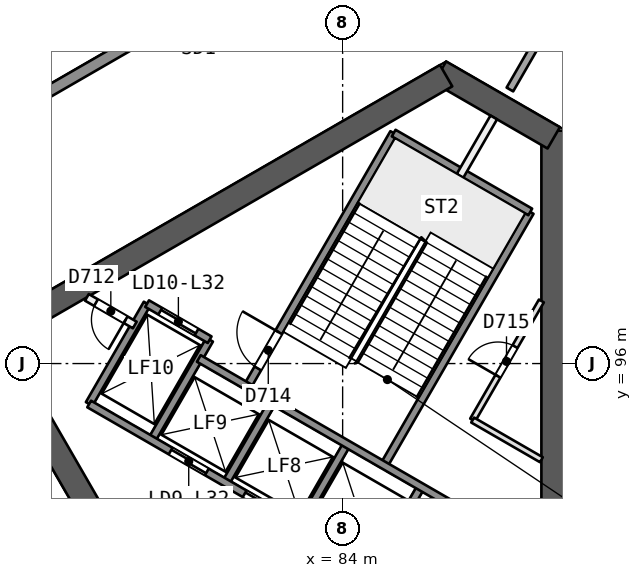
"""IFC4 building model, lengths in metres.
Left out: names, types, materials, properties, quantities, classifications, styles, units other than length and angle.
Written with IfcOpenShell. Run it as: python <this file> out.ifc"""

import sys

from ifc_helpers import new_model, si_unit, direction, frame, frame_2d, origin, place, context, subcontext, project, spatial, rectangle, extrude, element, fill, save


model = new_model("IFC4")
c1 = context("Model", 3, precision=1e-05, world=origin(), true_north=direction((0.0, 1.0)))
c2 = subcontext(c1, "Body", "Model", "MODEL_VIEW")
j1 = project(units=[si_unit("LENGTHUNIT", "METRE"), si_unit("PLANEANGLEUNIT", "RADIAN")], contexts=[c1])
p1 = place(None, origin())
s1 = spatial("IfcSite", under=j1, at=p1, CompositionType="ELEMENT")
p2 = place(p1, origin())
s2 = spatial("IfcBuilding", under=s1, at=p2, CompositionType="ELEMENT")
p3 = place(p2, frame((0.0, 0.0, 132.7)))
s3 = spatial("IfcBuildingStorey", under=s2, at=p3, CompositionType="ELEMENT", Elevation=132.7)
p4 = place(p3, frame((89.555, 88.119, 0.0), z_axis=(0.0, 0.0, 1.0), x_axis=(0.0, 1.0, 0.0)))
e1 = element("IfcWall", 1, at=p4, inside=s3, PredefinedType="SHEAR", context=c2, shape_type="SweptSolid", body=[
    extrude(rectangle(XDim=14.009, YDim=0.65, at=frame_2d((7.004, 0.0))), origin(), (0.0, 0.0, 1.0), 3.7),
])
p5 = place(p3, frame((89.555, 101.94, 0.0), z_axis=(0.0, 0.0, 1.0), x_axis=(-0.866031550877, 0.499989352773, 0.0)))
e2 = element("IfcWall", 2, at=p5, inside=s3, PredefinedType="SHEAR", context=c2, shape_type="SweptSolid", body=[
    extrude(rectangle(XDim=3.458, YDim=0.65, at=frame_2d((1.729, 0.0))), origin(), (0.0, 0.0, 1.0), 3.7),
])
p6 = place(p3, frame((86.723, 103.575, 0.0), z_axis=(0.0, 0.0, 1.0), x_axis=(-0.866031824457, -0.499988878904, 0.0)))
e3 = element("IfcWall", 3, at=p6, inside=s3, PredefinedType="SHEAR", context=c2, shape_type="SweptSolid", body=[
    extrude(rectangle(XDim=14.146, YDim=0.65, at=frame_2d((7.073, 0.0))), origin(), (0.0, 0.0, 1.0), 3.7),
])
p7 = place(p3, frame((74.754, 96.665, 0.0), z_axis=(0.0, 0.0, 1.0), x_axis=(0.500011799426, -0.866018591275, 0.0)))
e4 = element("IfcWall", 4, at=p7, inside=s3, PredefinedType="SHEAR", context=c2, shape_type="SweptSolid", body=[
    extrude(rectangle(XDim=10.055, YDim=0.65, at=frame_2d((5.027, 0.0))), origin(), (0.0, 0.0, 1.0), 3.7),
])
p8 = place(p7, frame((7.905, 0.0, 0.0)))
e5 = element("IfcOpeningElement", 5, at=p8, cuts=e4, PredefinedType="OPENING", context=c2, shape_type="SweptSolid", body=[
    extrude(rectangle(XDim=1.2, YDim=2.1, at=frame_2d((0.6, 1.05))), frame((0.0, 0.335, 0.0), z_axis=(0.0, -1.0, 0.0), x_axis=(1.0, 0.0, 0.0)), (0.0, 0.0, 1.0), 0.671),
])
p9 = place(p3, frame((91.877, 109.232, 0.0), z_axis=(0.0, 0.0, 1.0), x_axis=(-0.499972739829, -0.866041141879, 0.0)))
e6 = element("IfcWall", 6, at=p9, inside=s3, PredefinedType="PARTITIONING", context=c2, shape_type="SweptSolid", body=[
    extrude(rectangle(XDim=6.952, YDim=0.2, at=frame_2d((3.476, 0.0))), origin(), (0.0, 0.0, 1.0), 3.25),
])
p10 = place(p3, frame((72.541, 97.171, 0.0), z_axis=(0.0, 0.0, 1.0), x_axis=(0.5000018851, -0.866024315419, 0.0)))
e7 = element("IfcWall", 7, at=p10, inside=s3, PredefinedType="PARTITIONING", context=c2, shape_type="SweptSolid", body=[
    extrude(rectangle(XDim=9.0, YDim=0.2, at=frame_2d((4.5, 0.0))), origin(), (0.0, 0.0, 1.0), 3.25),
])
p11 = place(p3, frame((41.097, 82.858, 0.0), z_axis=(0.0, 0.0, 1.0), x_axis=(0.866026276916, 0.499998487688, 0.0)))
e8 = element("IfcWall", 8, at=p11, inside=s3, PredefinedType="SOLIDWALL", context=c2, shape_type="SweptSolid", body=[
    extrude(rectangle(XDim=55.864, YDim=0.3, at=frame_2d((27.932, 0.0))), origin(), (0.0, 0.0, 1.0), 3.25),
])
p12 = place(p11, frame((26.888, 0.0, 0.0)))
e9 = element("IfcOpeningElement", 9, at=p12, cuts=e8, PredefinedType="OPENING", context=c2, shape_type="SweptSolid", body=[
    extrude(rectangle(XDim=2.4, YDim=2.4, at=frame_2d((1.2, 1.2))), frame((0.0, 0.161, 0.0), z_axis=(0.0, -1.0, 0.0), x_axis=(1.0, 0.0, 0.0)), (0.0, 0.0, 1.0), 0.321),
])
p13 = place(p11, frame((32.188, 0.0, 0.0)))
e10 = element("IfcOpeningElement", 10, at=p13, cuts=e8, PredefinedType="OPENING", context=c2, shape_type="SweptSolid", body=[
    extrude(rectangle(XDim=2.4, YDim=2.4, at=frame_2d((1.2, 1.2))), frame((0.0, 0.161, 0.0), z_axis=(0.0, -1.0, 0.0), x_axis=(1.0, 0.0, 0.0)), (0.0, 0.0, 1.0), 0.321),
])
p14 = place(p11, frame((43.384, 0.0, 0.0)))
e11 = element("IfcOpeningElement", 11, at=p14, cuts=e8, PredefinedType="OPENING", context=c2, shape_type="SweptSolid", body=[
    extrude(rectangle(XDim=2.4, YDim=2.4, at=frame_2d((1.2, 1.2))), frame((0.0, 0.161, 0.0), z_axis=(0.0, -1.0, 0.0), x_axis=(1.0, 0.0, 0.0)), (0.0, 0.0, 1.0), 0.321),
])
p15 = place(p11, frame((21.432, 0.0, 0.0)))
e12 = element("IfcOpeningElement", 12, at=p15, cuts=e8, PredefinedType="OPENING", context=c2, shape_type="SweptSolid", body=[
    extrude(rectangle(XDim=2.4, YDim=2.4, at=frame_2d((1.2, 1.2))), frame((0.0, 0.161, 0.0), z_axis=(0.0, -1.0, 0.0), x_axis=(1.0, 0.0, 0.0)), (0.0, 0.0, 1.0), 0.321),
])
p16 = place(p11, frame((10.029, 0.0, 0.0)))
e13 = element("IfcOpeningElement", 13, at=p16, cuts=e8, PredefinedType="OPENING", context=c2, shape_type="SweptSolid", body=[
    extrude(rectangle(XDim=2.4, YDim=2.4, at=frame_2d((1.2, 1.2))), frame((0.0, 0.161, 0.0), z_axis=(0.0, -1.0, 0.0), x_axis=(1.0, 0.0, 0.0)), (0.0, 0.0, 1.0), 0.321),
])
p17 = place(p3, frame((87.421, 94.514, 0.0), z_axis=(0.0, 0.0, 1.0), x_axis=(0.499993116331, 0.866029378036, 0.0)))
e14 = element("IfcWall", 14, at=p17, inside=s3, PredefinedType="PARTITIONING", context=c2, shape_type="SweptSolid", body=[
    extrude(rectangle(XDim=3.618, YDim=0.15, at=frame_2d((1.809, 0.0))), origin(), (0.0, 0.0, 1.0), 3.25),
])
p18 = place(p17, frame((1.332, 0.0, 0.0)))
e15 = element("IfcOpeningElement", 15, at=p18, cuts=e14, PredefinedType="OPENING", context=c2, shape_type="SweptSolid", body=[
    extrude(rectangle(XDim=0.9, YDim=2.1, at=frame_2d((0.45, 1.05))), frame((0.0, 0.085, 0.0), z_axis=(0.0, -1.0, 0.0), x_axis=(1.0, 0.0, 0.0)), (0.0, 0.0, 1.0), 0.171),
])
p19 = place(p3, frame((84.821, 90.611, 0.0), z_axis=(0.0, 0.0, 1.0), x_axis=(0.499961042966, 0.86604789447, 0.0)))
e16 = element("IfcWall", 16, at=p19, inside=s3, PredefinedType="SOLIDWALL", context=c2, shape_type="SweptSolid", body=[
    extrude(rectangle(XDim=2.48, YDim=0.2, at=frame_2d((1.24, 0.0))), origin(), (0.0, 0.0, 1.0), 3.25),
])
p20 = place(p3, frame((85.087, 93.321, 0.0), z_axis=(0.0, 0.0, 1.0), x_axis=(0.500019787375, 0.866013979237, 0.0)))
e17 = element("IfcWall", 17, at=p20, inside=s3, PredefinedType="SOLIDWALL", context=c2, shape_type="SweptSolid", body=[
    extrude(rectangle(XDim=7.7, YDim=0.2, at=frame_2d((3.85, 0.0))), origin(), (0.0, 0.0, 1.0), 3.25),
])
p21 = place(p3, frame((82.873, 91.736, 0.0), z_axis=(0.0, 0.0, 1.0), x_axis=(0.499961042966, 0.86604789447, 0.0)))
e18 = element("IfcWall", 18, at=p21, inside=s3, PredefinedType="SOLIDWALL", context=c2, shape_type="SweptSolid", body=[
    extrude(rectangle(XDim=2.48, YDim=0.2, at=frame_2d((1.24, 0.0))), origin(), (0.0, 0.0, 1.0), 3.25),
])
p22 = place(p3, frame((87.09, 100.94, 0.0), z_axis=(0.0, 0.0, 1.0), x_axis=(0.499944938281, 0.866057191349, 0.0)))
e19 = element("IfcWall", 19, at=p22, inside=s3, PredefinedType="PARTITIONING", context=c2, shape_type="SweptSolid", body=[
    extrude(rectangle(XDim=1.773, YDim=0.2, at=frame_2d((0.887, 0.0))), origin(), (0.0, 0.0, 1.0), 3.25),
])
p23 = place(p3, frame((80.924, 92.861, 0.0), z_axis=(0.0, 0.0, 1.0), x_axis=(0.499961042966, 0.86604789447, 0.0)))
e20 = element("IfcWall", 20, at=p23, inside=s3, PredefinedType="SOLIDWALL", context=c2, shape_type="SweptSolid", body=[
    extrude(rectangle(XDim=2.48, YDim=0.2, at=frame_2d((1.24, 0.0))), origin(), (0.0, 0.0, 1.0), 3.25),
])
p24 = place(p3, frame((81.493, 95.396, 0.0), z_axis=(0.0, 0.0, 1.0), x_axis=(0.500006057782, 0.866021906294, 0.0)))
e21 = element("IfcWall", 21, at=p24, inside=s3, PredefinedType="SOLIDWALL", context=c2, shape_type="SweptSolid", body=[
    extrude(rectangle(XDim=7.7, YDim=0.2, at=frame_2d((3.85, 0.0))), origin(), (0.0, 0.0, 1.0), 3.25),
])
p25 = place(p24, frame((0.55, 0.0, 0.0)))
e22 = element("IfcOpeningElement", 22, at=p25, cuts=e21, PredefinedType="OPENING", context=c2, shape_type="SweptSolid", body=[
    extrude(rectangle(XDim=1.1, YDim=2.1, at=frame_2d((0.55, 1.05))), frame((0.0, 0.11, 0.0), z_axis=(0.0, -1.0, 0.0), x_axis=(1.0, 0.0, 0.0)), (0.0, 0.0, 1.0), 0.221),
])
for number, where, z_axis, x_axis in (
    (23, (78.976, 93.986, 0.0), (0.0, 0.0, 1.0), (0.5, 0.866, 0.0)),
    (24, (77.33, 94.936, 0.0), (0.0, 0.0, 1.0), (0.5, 0.866, 0.0)),
):
    element("IfcWall", number, at=place(p3, frame(where, z_axis=z_axis, x_axis=x_axis)), inside=s3, PredefinedType="SOLIDWALL", context=c2, shape_type="SweptSolid", body=[
        extrude(rectangle(XDim=3.05, YDim=0.2, at=frame_2d((1.525, 0.0))), origin(), (0.0, 0.0, 1.0), 3.25),
    ])
p26 = place(p3, frame((86.77, 89.486, 0.0), z_axis=(0.0, 0.0, 1.0), x_axis=(-0.86601811187, 0.500012629753, 0.0)))
e25 = element("IfcWall", 25, at=p26, inside=s3, PredefinedType="SOLIDWALL", context=c2, shape_type="SweptSolid", body=[
    extrude(rectangle(XDim=10.9, YDim=0.2, at=frame_2d((5.45, 0.0))), origin(), (0.0, 0.0, 1.0), 3.25),
])
p27 = place(p26, frame((0.575, 0.0, 0.0)))
e26 = element("IfcOpeningElement", 26, at=p27, cuts=e25, PredefinedType="OPENING", context=c2, shape_type="SweptSolid", body=[
    extrude(rectangle(XDim=1.1, YDim=2.1, at=frame_2d((0.55, 1.05))), frame((0.0, 0.11, 0.0), z_axis=(0.0, -1.0, 0.0), x_axis=(1.0, 0.0, 0.0)), (0.0, 0.0, 1.0), 0.221),
])
p28 = place(p26, frame((2.825, 0.0, 0.0)))
e27 = element("IfcOpeningElement", 27, at=p28, cuts=e25, PredefinedType="OPENING", context=c2, shape_type="SweptSolid", body=[
    extrude(rectangle(XDim=1.1, YDim=2.1, at=frame_2d((0.55, 1.05))), frame((0.0, 0.11, 0.0), z_axis=(0.0, -1.0, 0.0), x_axis=(1.0, 0.0, 0.0)), (0.0, 0.0, 1.0), 0.221),
])
p29 = place(p26, frame((5.075, 0.0, 0.0)))
e28 = element("IfcOpeningElement", 28, at=p29, cuts=e25, PredefinedType="OPENING", context=c2, shape_type="SweptSolid", body=[
    extrude(rectangle(XDim=1.1, YDim=2.1, at=frame_2d((0.55, 1.05))), frame((0.0, 0.11, 0.0), z_axis=(0.0, -1.0, 0.0), x_axis=(1.0, 0.0, 0.0)), (0.0, 0.0, 1.0), 0.221),
])
p30 = place(p26, frame((7.325, 0.0, 0.0)))
e29 = element("IfcOpeningElement", 29, at=p30, cuts=e25, PredefinedType="OPENING", context=c2, shape_type="SweptSolid", body=[
    extrude(rectangle(XDim=1.1, YDim=2.1, at=frame_2d((0.55, 1.05))), frame((0.0, 0.11, 0.0), z_axis=(0.0, -1.0, 0.0), x_axis=(1.0, 0.0, 0.0)), (0.0, 0.0, 1.0), 0.221),
])
p31 = place(p3, frame((78.53, 97.014, 0.0), z_axis=(0.0, 0.0, 1.0), x_axis=(-0.866045896294, 0.499964504253, 0.0)))
e30 = element("IfcWall", 30, at=p31, inside=s3, PredefinedType="PARTITIONING", context=c2, shape_type="SweptSolid", body=[
    extrude(rectangle(XDim=1.455, YDim=0.2, at=frame_2d((0.728, 0.0))), origin(), (0.0, 0.0, 1.0), 3.25),
])
p32 = place(p31, frame((0.278, 0.0, 0.0)))
e31 = element("IfcOpeningElement", 31, at=p32, cuts=e30, PredefinedType="OPENING", context=c2, shape_type="SweptSolid", body=[
    extrude(rectangle(XDim=0.9, YDim=2.1, at=frame_2d((0.45, 1.05))), frame((0.0, 0.11, 0.0), z_axis=(0.0, -1.0, 0.0), x_axis=(1.0, 0.0, 0.0)), (0.0, 0.0, 1.0), 0.221),
])
p33 = place(p3, frame((88.01, 91.634, 0.0), z_axis=(0.0, 0.0, 1.0), x_axis=(-0.866024315419, 0.5000018851, 0.0)))
e32 = element("IfcWall", 32, at=p33, inside=s3, PredefinedType="SOLIDWALL", context=c2, shape_type="SweptSolid", body=[
    extrude(rectangle(XDim=9.0, YDim=0.2, at=frame_2d((4.5, 0.0))), origin(), (0.0, 0.0, 1.0), 3.25),
])
p34 = place(p3, frame((80.5, 96.627, 0.0), z_axis=(0.0, 0.0, 1.0), x_axis=(-0.86601224135, 0.500022797313, 0.0)))
e33 = element("IfcWall", 33, at=p34, inside=s3, PredefinedType="SOLIDWALL", context=c2, shape_type="SweptSolid", body=[
    extrude(rectangle(XDim=1.9, YDim=0.2, at=frame_2d((0.95, 0.0))), origin(), (0.0, 0.0, 1.0), 3.25),
])
p35 = place(p34, frame((0.4, 0.0, 0.0)))
e34 = element("IfcOpeningElement", 34, at=p35, cuts=e33, PredefinedType="OPENING", context=c2, shape_type="SweptSolid", body=[
    extrude(rectangle(XDim=1.1, YDim=2.1, at=frame_2d((0.55, 1.05))), frame((0.0, 0.11, 0.0), z_axis=(0.0, -1.0, 0.0), x_axis=(1.0, 0.0, 0.0)), (0.0, 0.0, 1.0), 0.221),
])
p36 = place(p3, frame((89.23, 93.469, 0.0), z_axis=(0.0, 0.0, 1.0), x_axis=(-0.866004557827, 0.500036104519, 0.0)))
e35 = element("IfcWall", 35, at=p36, inside=s3, PredefinedType="PARTITIONING", context=c2, shape_type="SweptSolid", body=[
    extrude(rectangle(XDim=2.089, YDim=0.15, at=frame_2d((1.044, 0.0))), origin(), (0.0, 0.0, 1.0), 3.25),
])
p37 = place(p3, frame((88.937, 99.99, 0.0), z_axis=(0.0, 0.0, 1.0), x_axis=(-0.866004344652, 0.500036473714, 0.0)))
e36 = element("IfcWall", 36, at=p37, inside=s3, PredefinedType="SOLIDWALL", context=c2, shape_type="SweptSolid", body=[
    extrude(rectangle(XDim=4.15, YDim=0.2, at=frame_2d((2.075, 0.0))), origin(), (0.0, 0.0, 1.0), 3.25),
])
p38 = place(p29, origin())
e37 = element("IfcDoor", 37, at=p38, inside=s3, OperationType="SLIDING_TO_RIGHT", PredefinedType="NOTDEFINED", context=c2, shape_type="SweptSolid", body=[
    extrude(rectangle(XDim=1.1, YDim=2.1, at=frame_2d((0.55, 1.05))), frame((0.0, 0.025, 0.0), z_axis=(0.0, -1.0, 0.0), x_axis=(1.0, 0.0, 0.0)), (0.0, 0.0, 1.0), 0.05),
])
fill(e28, e37)
p39 = place(p30, origin())
e38 = element("IfcDoor", 38, at=p39, inside=s3, OperationType="SLIDING_TO_LEFT", PredefinedType="NOTDEFINED", context=c2, shape_type="SweptSolid", body=[
    extrude(rectangle(XDim=1.1, YDim=2.1, at=frame_2d((0.55, 1.05))), frame((0.0, 0.025, 0.0), z_axis=(0.0, -1.0, 0.0), x_axis=(1.0, 0.0, 0.0)), (0.0, 0.0, 1.0), 0.05),
])
fill(e29, e38)
p40 = place(p35, origin())
e39 = element("IfcDoor", 39, at=p40, inside=s3, OperationType="SLIDING_TO_RIGHT", PredefinedType="NOTDEFINED", context=c2, shape_type="SweptSolid", body=[
    extrude(rectangle(XDim=1.1, YDim=2.1, at=frame_2d((0.55, 1.05))), frame((0.0, 0.025, 0.0), z_axis=(0.0, -1.0, 0.0), x_axis=(1.0, 0.0, 0.0)), (0.0, 0.0, 1.0), 0.05),
])
fill(e34, e39)
p41 = place(p32, origin())
e40 = element("IfcDoor", 40, at=p41, inside=s3, OperationType="SINGLE_SWING_LEFT", PredefinedType="NOTDEFINED", context=c2, shape_type="SweptSolid", body=[
    extrude(rectangle(XDim=0.9, YDim=2.1, at=frame_2d((0.45, 1.05))), frame((0.0, 0.025, 0.0), z_axis=(0.0, -1.0, 0.0), x_axis=(1.0, 0.0, 0.0)), (0.0, 0.0, 1.0), 0.05),
])
fill(e31, e40)
p42 = place(p25, origin())
e41 = element("IfcDoor", 41, at=p42, inside=s3, OperationType="SINGLE_SWING_RIGHT", PredefinedType="NOTDEFINED", context=c2, shape_type="SweptSolid", body=[
    extrude(rectangle(XDim=1.1, YDim=2.1, at=frame_2d((0.55, 1.05))), frame((0.0, 0.025, 0.0), z_axis=(0.0, -1.0, 0.0), x_axis=(1.0, 0.0, 0.0)), (0.0, 0.0, 1.0), 0.05),
])
fill(e22, e41)
p43 = place(p18, origin())
e42 = element("IfcDoor", 42, at=p43, inside=s3, OperationType="SINGLE_SWING_LEFT", PredefinedType="NOTDEFINED", context=c2, shape_type="SweptSolid", body=[
    extrude(rectangle(XDim=0.9, YDim=2.1, at=frame_2d((0.45, 1.05))), frame((0.0, 0.025, 0.0), z_axis=(0.0, -1.0, 0.0), x_axis=(1.0, 0.0, 0.0)), (0.0, 0.0, 1.0), 0.05),
])
fill(e15, e42)
save(model, sys.argv[1])
